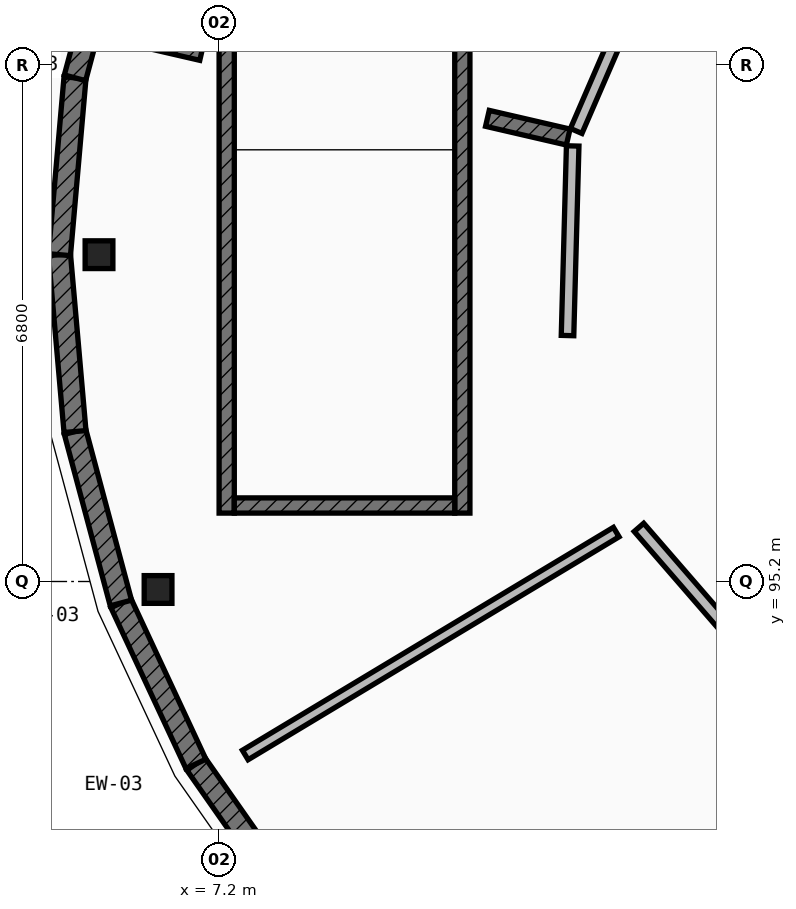
"""IFC4 building model, lengths in metres.
Left out: names, types, materials, properties, quantities, classifications, styles, units other than length and angle.
Written with IfcOpenShell. Run it as: python <this file> out.ifc"""

import sys

from ifc_helpers import new_model, si_unit, direction, frame, frame_2d, origin, origin_2d, place, context, subcontext, project, spatial, rectangle, extrude, element, fill, save


model = new_model("IFC4")
c1 = context("Model", 3, precision=1e-05, world=origin(), true_north=direction((0.0, 1.0)))
c2 = subcontext(c1, "Body", "Model", "MODEL_VIEW")
j1 = project(units=[si_unit("LENGTHUNIT", "METRE"), si_unit("PLANEANGLEUNIT", "RADIAN")], contexts=[c1])
p1 = place(None, origin())
s1 = spatial("IfcSite", under=j1, at=p1, CompositionType="ELEMENT")
p2 = place(p1, origin())
s2 = spatial("IfcBuilding", under=s1, at=p2, CompositionType="ELEMENT")
p3 = place(p2, frame((0.0, 0.0, 8.75)))
s3 = spatial("IfcBuildingStorey", under=s2, at=p3, CompositionType="ELEMENT", Elevation=8.75)
for number, where, z_axis, x_axis in (
    (1, (5.62, 99.5, 0.0), (0.0, 0.0, 1.0), (1.0, 0.0, 0.0)),
    (2, (6.397, 95.095, 0.0), (0.0, 0.0, 1.0), (1.0, 0.0, 0.0)),
):
    element("IfcColumn", number, at=place(p3, frame(where, z_axis=z_axis, x_axis=x_axis)), inside=s3, PredefinedType="COLUMN", context=c2, shape_type="SweptSolid", body=[
        extrude(rectangle(XDim=0.365, YDim=0.365, at=origin_2d()), origin(), (0.0, 0.0, 1.0), 4.2),
    ])
p4 = place(p3, frame((8.235, 90.887, 0.0), z_axis=(0.0, 0.0, 1.0), x_axis=(-0.573728883722, 0.819045278347, 0.0)))
e3 = element("IfcWall", 3, at=p4, inside=s3, PredefinedType="ELEMENTEDWALL", context=c2, shape_type="SweptSolid", body=[
    extrude(rectangle(XDim=2.336, YDim=0.29, at=frame_2d((1.168, 0.0))), origin(), (0.0, 0.0, 1.0), 3.329),
])
p5 = place(p4, frame((0.743, 0.0, 0.85)))
e4 = element("IfcOpeningElement", 4, at=p5, cuts=e3, PredefinedType="OPENING", context=c2, shape_type="SweptSolid", body=[
    extrude(rectangle(XDim=0.85, YDim=1.5, at=frame_2d((0.425, 0.75))), frame((0.0, 0.155, 0.0), z_axis=(0.0, -1.0, 0.0), x_axis=(1.0, 0.0, 0.0)), (0.0, 0.0, 1.0), 0.31),
])
p6 = place(p3, frame((6.895, 92.8, 0.0), z_axis=(0.0, 0.0, 1.0), x_axis=(-0.422587894318, 0.906321946979, 0.0)))
e5 = element("IfcWall", 5, at=p6, inside=s3, PredefinedType="ELEMENTEDWALL", context=c2, shape_type="SweptSolid", body=[
    extrude(rectangle(XDim=2.336, YDim=0.29, at=frame_2d((1.168, 0.0))), origin(), (0.0, 0.0, 1.0), 3.329),
])
p7 = place(p6, frame((0.743, 0.0, 0.85)))
e6 = element("IfcOpeningElement", 6, at=p7, cuts=e5, PredefinedType="OPENING", context=c2, shape_type="SweptSolid", body=[
    extrude(rectangle(XDim=0.85, YDim=1.75, at=frame_2d((0.425, 0.875))), frame((0.0, 0.155, 0.0), z_axis=(0.0, -1.0, 0.0), x_axis=(1.0, 0.0, 0.0)), (0.0, 0.0, 1.0), 0.31),
])
p8 = place(p3, frame((5.908, 94.917, 0.0), z_axis=(0.0, 0.0, 1.0), x_axis=(-0.258612423585, 0.965981166673, 0.0)))
e7 = element("IfcWall", 7, at=p8, inside=s3, PredefinedType="ELEMENTEDWALL", context=c2, shape_type="SweptSolid", body=[
    extrude(rectangle(XDim=2.335, YDim=0.29, at=frame_2d((1.168, 0.0))), origin(), (0.0, 0.0, 1.0), 3.329),
])
p9 = place(p8, frame((0.728, 0.0, 0.85)))
e8 = element("IfcOpeningElement", 8, at=p9, cuts=e7, PredefinedType="OPENING", context=c2, shape_type="SweptSolid", body=[
    extrude(rectangle(XDim=0.88, YDim=1.6, at=frame_2d((0.44, 0.8))), frame((0.0, 0.155, 0.0), z_axis=(0.0, -1.0, 0.0), x_axis=(1.0, 0.0, 0.0)), (0.0, 0.0, 1.0), 0.31),
])
for number, where, z_axis, x_axis in (
    (9, (5.304, 97.173, 0.0), (0.0, 0.0, 1.0), (-0.087, 0.996, 0.0)),
    (10, (5.1, 99.5, 0.0), (0.0, 0.0, 1.0), (0.087, 0.996, 0.0)),
):
    element("IfcWall", number, at=place(p3, frame(where, z_axis=z_axis, x_axis=x_axis)), inside=s3, PredefinedType="ELEMENTEDWALL", context=c2, shape_type="SweptSolid", body=[
        extrude(rectangle(XDim=2.336, YDim=0.29, at=frame_2d((1.168, 0.0))), origin(), (0.0, 0.0, 1.0), 3.329),
    ])
p10 = place(p3, frame((5.304, 101.827, 0.0), z_axis=(0.0, 0.0, 1.0), x_axis=(0.258612423585, 0.965981166673, 0.0)))
e11 = element("IfcWall", 11, at=p10, inside=s3, PredefinedType="ELEMENTEDWALL", context=c2, shape_type="SweptSolid", body=[
    extrude(rectangle(XDim=2.335, YDim=0.29, at=frame_2d((1.168, 0.0))), origin(), (0.0, 0.0, 1.0), 3.329),
])
p11 = place(p10, frame((0.718, 0.0, 0.85)))
e12 = element("IfcOpeningElement", 12, at=p11, cuts=e11, PredefinedType="OPENING", context=c2, shape_type="SweptSolid", body=[
    extrude(rectangle(XDim=0.9, YDim=1.4, at=frame_2d((0.45, 0.7))), frame((0.0, 0.155, 0.0), z_axis=(0.0, -1.0, 0.0), x_axis=(1.0, 0.0, 0.0)), (0.0, 0.0, 1.0), 0.31),
])
p12 = place(p3, frame((10.4, 96.1, 0.0), z_axis=(0.0, 0.0, 1.0), x_axis=(0.0, 1.0, 0.0)))
e13 = element("IfcWall", 13, at=p12, inside=s3, PredefinedType="SHEAR", context=c2, shape_type="SweptSolid", body=[
    extrude(rectangle(XDim=6.8, YDim=0.2, at=frame_2d((3.4, 0.0))), origin(), (0.0, 0.0, 1.0), 3.975),
])
p13 = place(p12, frame((0.38, 0.0, 0.0)))
e14 = element("IfcOpeningElement", 14, at=p13, cuts=e13, PredefinedType="OPENING", context=c2, shape_type="SweptSolid", body=[
    extrude(rectangle(XDim=1.05, YDim=2.15, at=frame_2d((0.525, 1.075))), frame((0.0, 0.11, 0.0), z_axis=(0.0, -1.0, 0.0), x_axis=(1.0, 0.0, 0.0)), (0.0, 0.0, 1.0), 0.22),
])
p14 = place(p3, frame((7.3, 96.1, 0.0), z_axis=(0.0, 0.0, 1.0), x_axis=(0.0, 1.0, 0.0)))
e15 = element("IfcWall", 15, at=p14, inside=s3, PredefinedType="SHEAR", context=c2, shape_type="SweptSolid", body=[
    extrude(rectangle(XDim=6.8, YDim=0.2, at=frame_2d((3.4, 0.0))), origin(), (0.0, 0.0, 1.0), 3.975),
])
p15 = place(p3, frame((10.3, 96.2, 0.0), z_axis=(0.0, 0.0, 1.0), x_axis=(-1.0, 0.0, 0.0)))
e16 = element("IfcWall", 16, at=p15, inside=s3, PredefinedType="SHEAR", context=c2, shape_type="SweptSolid", body=[
    extrude(rectangle(XDim=2.9, YDim=0.2, at=frame_2d((1.45, 0.0))), origin(), (0.0, 0.0, 1.0), 3.975),
])
p16 = place(p3, frame((11.793, 101.048, 0.0), z_axis=(0.0, 0.0, 1.0), x_axis=(-0.974281711151, 0.225333413672, 0.0)))
e17 = element("IfcWall", 17, at=p16, inside=s3, PredefinedType="SOLIDWALL", context=c2, shape_type="SweptSolid", body=[
    extrude(rectangle(XDim=1.091, YDim=0.215, at=frame_2d((0.545, 0.0))), origin(), (0.0, 0.0, 1.0), 3.304),
])
p17 = place(p3, frame((6.97, 102.162, 0.0), z_axis=(0.0, 0.0, 1.0), x_axis=(-0.974364486591, 0.22497521479, 0.0)))
e18 = element("IfcWall", 18, at=p17, inside=s3, PredefinedType="SOLIDWALL", context=c2, shape_type="SweptSolid", body=[
    extrude(rectangle(XDim=0.925, YDim=0.215, at=frame_2d((0.462, 0.0))), origin(), (0.0, 0.0, 1.0), 3.304),
])
p18 = place(p3, frame((12.425, 95.85, 0.0), z_axis=(0.0, 0.0, 1.0), x_axis=(-0.857148493381, -0.515069374255, 0.0)))
e19 = element("IfcWall", 19, at=p18, inside=s3, PredefinedType="PARTITIONING", context=c2, shape_type="SweptSolid", body=[
    extrude(rectangle(XDim=5.695, YDim=0.145, at=frame_2d((2.847, 0.0))), origin(), (0.0, 0.0, 1.0), 3.304),
])
p19 = place(p3, frame((12.797, 103.204, 0.0), z_axis=(0.0, 0.0, 1.0), x_axis=(-0.397419678039, -0.917636964985, 0.0)))
e20 = element("IfcWall", 20, at=p19, inside=s3, PredefinedType="PARTITIONING", context=c2, shape_type="SweptSolid", body=[
    extrude(rectangle(XDim=2.262, YDim=0.165, at=frame_2d((1.131, 0.0))), origin(), (0.0, 0.0, 1.0), 3.304),
])
p20 = place(p3, frame((11.852, 100.931, 0.0), z_axis=(0.0, 0.0, 1.0), x_axis=(-0.027291914499, -0.999627506326, 0.0)))
e21 = element("IfcWall", 21, at=p20, inside=s3, PredefinedType="PARTITIONING", context=c2, shape_type="SweptSolid", body=[
    extrude(rectangle(XDim=2.496, YDim=0.165, at=frame_2d((1.248, 0.0))), origin(), (0.0, 0.0, 1.0), 3.304),
])
p21 = place(p20, frame((0.523, 0.0, 0.0)))
e22 = element("IfcOpeningElement", 22, at=p21, cuts=e21, PredefinedType="OPENING", context=c2, shape_type="SweptSolid", body=[
    extrude(rectangle(XDim=1.45, YDim=2.28, at=frame_2d((0.725, 1.14))), frame((0.0, 0.093, 0.0), z_axis=(0.0, -1.0, 0.0), x_axis=(1.0, 0.0, 0.0)), (0.0, 0.0, 1.0), 0.185),
])
p22 = place(p3, frame((12.724, 95.912, 0.0), z_axis=(0.0, 0.0, 1.0), x_axis=(0.654887207042, -0.755726634473, 0.0)))
e23 = element("IfcWall", 23, at=p22, inside=s3, PredefinedType="PARTITIONING", context=c2, shape_type="SweptSolid", body=[
    extrude(rectangle(XDim=2.145, YDim=0.165, at=frame_2d((1.073, 0.0))), origin(), (0.0, 0.0, 1.0), 3.304),
])
p23 = place(p22, frame((0.488, 0.0, 0.0)))
e24 = element("IfcOpeningElement", 24, at=p23, cuts=e23, PredefinedType="OPENING", context=c2, shape_type="SweptSolid", body=[
    extrude(rectangle(XDim=1.17, YDim=2.24, at=frame_2d((0.585, 1.12))), frame((0.0, 0.093, 0.0), z_axis=(0.0, -1.0, 0.0), x_axis=(1.0, 0.0, 0.0)), (0.0, 0.0, 1.0), 0.185),
])
p24 = place(p5, origin())
e25 = element("IfcWindow", 25, at=p24, inside=s3, PartitioningType="SINGLE_PANEL", PredefinedType="WINDOW", context=c2, shape_type="SweptSolid", body=[
    extrude(rectangle(XDim=0.85, YDim=1.5, at=frame_2d((0.425, 0.75))), frame((0.0, 0.03, 0.0), z_axis=(0.0, -1.0, 0.0), x_axis=(1.0, 0.0, 0.0)), (0.0, 0.0, 1.0), 0.06),
])
fill(e4, e25)
p25 = place(p7, origin())
e26 = element("IfcWindow", 26, at=p25, inside=s3, PartitioningType="SINGLE_PANEL", PredefinedType="WINDOW", context=c2, shape_type="SweptSolid", body=[
    extrude(rectangle(XDim=0.85, YDim=1.75, at=frame_2d((0.425, 0.875))), frame((0.0, 0.03, 0.0), z_axis=(0.0, -1.0, 0.0), x_axis=(1.0, 0.0, 0.0)), (0.0, 0.0, 1.0), 0.06),
])
fill(e6, e26)
p26 = place(p9, origin())
e27 = element("IfcWindow", 27, at=p26, inside=s3, PartitioningType="SINGLE_PANEL", PredefinedType="WINDOW", context=c2, shape_type="SweptSolid", body=[
    extrude(rectangle(XDim=0.88, YDim=1.6, at=frame_2d((0.44, 0.8))), frame((0.0, 0.03, 0.0), z_axis=(0.0, -1.0, 0.0), x_axis=(1.0, 0.0, 0.0)), (0.0, 0.0, 1.0), 0.06),
])
fill(e8, e27)
p27 = place(p13, origin())
e28 = element("IfcDoor", 28, at=p27, inside=s3, OperationType="SINGLE_SWING_LEFT", PredefinedType="DOOR", context=c2, shape_type="SweptSolid", body=[
    extrude(rectangle(XDim=1.05, YDim=2.15, at=frame_2d((0.525, 1.075))), frame((0.0, 0.025, 0.0), z_axis=(0.0, -1.0, 0.0), x_axis=(1.0, 0.0, 0.0)), (0.0, 0.0, 1.0), 0.05),
])
fill(e14, e28)
p28 = place(p21, origin())
e29 = element("IfcDoor", 29, at=p28, inside=s3, OperationType="SINGLE_SWING_RIGHT", PredefinedType="DOOR", context=c2, shape_type="SweptSolid", body=[
    extrude(rectangle(XDim=1.45, YDim=2.28, at=frame_2d((0.725, 1.14))), frame((0.0, 0.025, 0.0), z_axis=(0.0, -1.0, 0.0), x_axis=(1.0, 0.0, 0.0)), (0.0, 0.0, 1.0), 0.05),
])
fill(e22, e29)
p29 = place(p23, origin())
e30 = element("IfcDoor", 30, at=p29, inside=s3, OperationType="SINGLE_SWING_LEFT", PredefinedType="DOOR", context=c2, shape_type="SweptSolid", body=[
    extrude(rectangle(XDim=1.17, YDim=2.24, at=frame_2d((0.585, 1.12))), frame((0.0, 0.025, 0.0), z_axis=(0.0, -1.0, 0.0), x_axis=(1.0, 0.0, 0.0)), (0.0, 0.0, 1.0), 0.05),
])
fill(e24, e30)
save(model, sys.argv[1])
